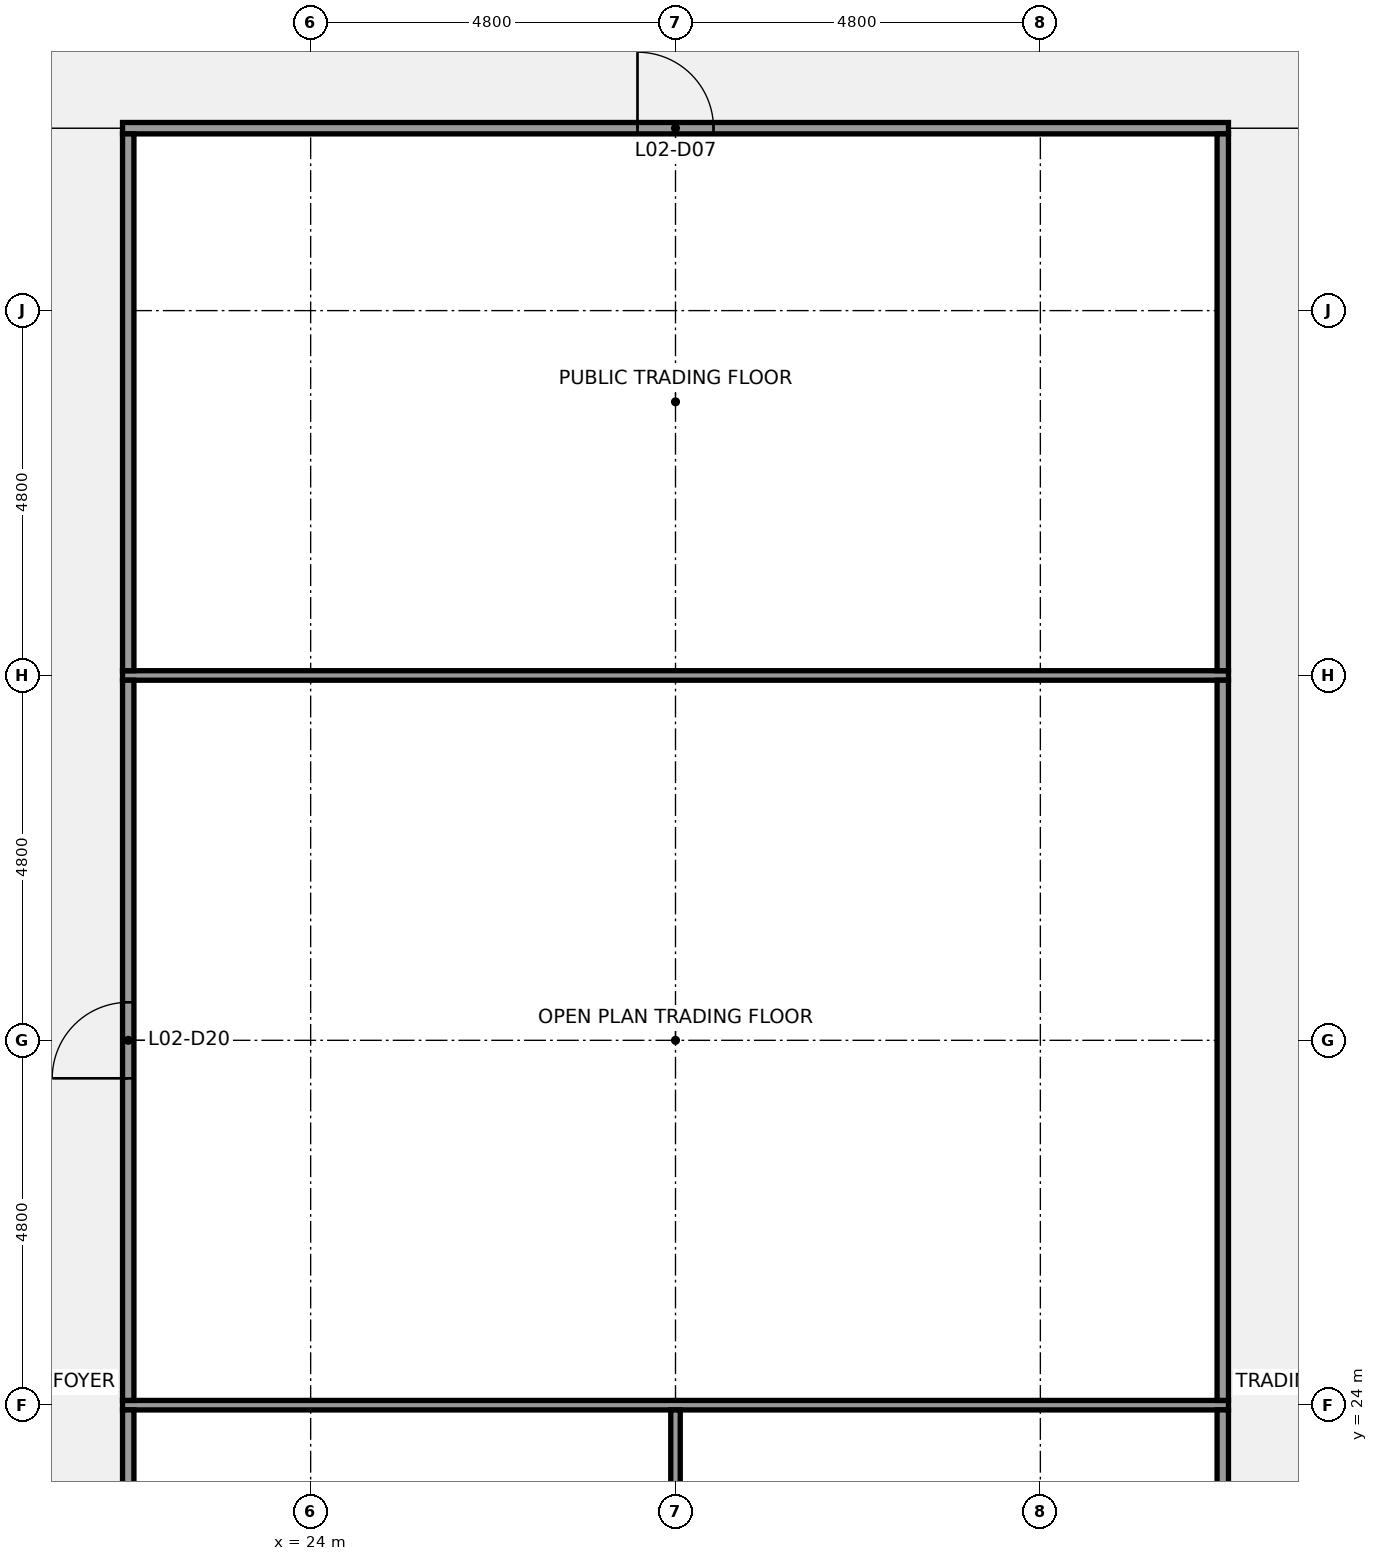
"""IFC4 building model, lengths in metres.
Left out: names, types, materials, properties, quantities, classifications, styles, units other than length and angle.
Written with IfcOpenShell. Run it as: python <this file> out.ifc"""

import sys

from ifc_helpers import new_model, si_unit, direction, frame, frame_2d, origin, place, context, subcontext, project, spatial, rectangle, extrude, element, fill, save


model = new_model("IFC4")
c1 = context("Model", 3, precision=1e-05, world=origin(), true_north=direction((0.0, 1.0)))
c2 = subcontext(c1, "Body", "Model", "MODEL_VIEW")
j1 = project(units=[si_unit("LENGTHUNIT", "METRE"), si_unit("PLANEANGLEUNIT", "RADIAN")], contexts=[c1])
p1 = place(None, origin())
s1 = spatial("IfcSite", under=j1, at=p1, CompositionType="ELEMENT")
p2 = place(p1, origin())
s2 = spatial("IfcBuilding", under=s1, at=p2, CompositionType="ELEMENT")
p3 = place(p2, frame((0.0, 0.0, 17.0)))
s3 = spatial("IfcBuildingStorey", under=s2, at=p3, CompositionType="ELEMENT", Elevation=17.0)
for number, where, z_axis, x_axis in (
    (1, (21.525, 24.0, 0.0), (0.0, 0.0, 1.0), (1.0, 0.0, 0.0)),
    (2, (21.525, 33.6, 0.0), (0.0, 0.0, 1.0), (1.0, 0.0, 0.0)),
):
    element("IfcWall", number, at=place(p3, frame(where, z_axis=z_axis, x_axis=x_axis)), inside=s3, PredefinedType="PARTITIONING", context=c2, shape_type="SweptSolid", body=[
        extrude(rectangle(XDim=14.55, YDim=0.125, at=frame_2d((7.275, 0.0))), origin(), (0.0, 0.0, 1.0), 3.25),
    ])
p4 = place(p3, frame((21.525, 40.8, 0.0), z_axis=(0.0, 0.0, 1.0), x_axis=(1.0, 0.0, 0.0)))
e3 = element("IfcWall", 3, at=p4, inside=s3, PredefinedType="PARTITIONING", context=c2, shape_type="SweptSolid", body=[
    extrude(rectangle(XDim=14.55, YDim=0.15, at=frame_2d((7.275, 0.0))), origin(), (0.0, 0.0, 1.0), 3.25),
])
p5 = place(p4, frame((6.775, 0.0, 0.0)))
e4 = element("IfcOpeningElement", 4, at=p5, cuts=e3, PredefinedType="OPENING", context=c2, shape_type="SweptSolid", body=[
    extrude(rectangle(XDim=1.0, YDim=2.1, at=frame_2d((0.5, 1.05))), frame((0.0, 0.085, 0.0), z_axis=(0.0, -1.0, 0.0), x_axis=(1.0, 0.0, 0.0)), (0.0, 0.0, 1.0), 0.17),
])
p6 = place(p3, frame((21.6, 14.462, 0.0), z_axis=(0.0, 0.0, 1.0), x_axis=(0.0, 1.0, 0.0)))
e5 = element("IfcWall", 5, at=p6, inside=s3, PredefinedType="PARTITIONING", context=c2, shape_type="SweptSolid", body=[
    extrude(rectangle(XDim=9.475, YDim=0.15, at=frame_2d((4.738, 0.0))), origin(), (0.0, 0.0, 1.0), 3.25),
])
p7 = place(p6, frame((4.238, 0.0, 0.0)))
e6 = element("IfcOpeningElement", 6, at=p7, cuts=e5, PredefinedType="OPENING", context=c2, shape_type="SweptSolid", body=[
    extrude(rectangle(XDim=1.0, YDim=2.1, at=frame_2d((0.5, 1.05))), frame((0.0, 0.085, 0.0), z_axis=(0.0, -1.0, 0.0), x_axis=(1.0, 0.0, 0.0)), (0.0, 0.0, 1.0), 0.17),
])
p8 = place(p3, frame((21.6, 24.062, 0.0), z_axis=(0.0, 0.0, 1.0), x_axis=(0.0, 1.0, 0.0)))
e7 = element("IfcWall", 7, at=p8, inside=s3, PredefinedType="PARTITIONING", context=c2, shape_type="SweptSolid", body=[
    extrude(rectangle(XDim=9.475, YDim=0.15, at=frame_2d((4.738, 0.0))), origin(), (0.0, 0.0, 1.0), 3.25),
])
p9 = place(p8, frame((4.238, 0.0, 0.0)))
e8 = element("IfcOpeningElement", 8, at=p9, cuts=e7, PredefinedType="OPENING", context=c2, shape_type="SweptSolid", body=[
    extrude(rectangle(XDim=1.0, YDim=2.1, at=frame_2d((0.5, 1.05))), frame((0.0, 0.085, 0.0), z_axis=(0.0, -1.0, 0.0), x_axis=(1.0, 0.0, 0.0)), (0.0, 0.0, 1.0), 0.17),
])
p10 = place(p3, frame((21.6, 33.663, 0.0), z_axis=(0.0, 0.0, 1.0), x_axis=(0.0, 1.0, 0.0)))
e9 = element("IfcWall", 9, at=p10, inside=s3, PredefinedType="PARTITIONING", context=c2, shape_type="SweptSolid", body=[
    extrude(rectangle(XDim=7.062, YDim=0.15, at=frame_2d((3.531, 0.0))), origin(), (0.0, 0.0, 1.0), 3.25),
])
p11 = place(p3, frame((28.8, 14.462, 0.0), z_axis=(0.0, 0.0, 1.0), x_axis=(0.0, 1.0, 0.0)))
e10 = element("IfcWall", 10, at=p11, inside=s3, PredefinedType="PARTITIONING", context=c2, shape_type="SweptSolid", body=[
    extrude(rectangle(XDim=9.475, YDim=0.125, at=frame_2d((4.738, 0.0))), origin(), (0.0, 0.0, 1.0), 3.25),
])
p12 = place(p3, frame((36.0, 14.462, 0.0), z_axis=(0.0, 0.0, 1.0), x_axis=(0.0, 1.0, 0.0)))
e11 = element("IfcWall", 11, at=p12, inside=s3, PredefinedType="PARTITIONING", context=c2, shape_type="SweptSolid", body=[
    extrude(rectangle(XDim=9.475, YDim=0.15, at=frame_2d((4.738, 0.0))), origin(), (0.0, 0.0, 1.0), 3.25),
])
p13 = place(p12, frame((4.238, 0.0, 0.0)))
e12 = element("IfcOpeningElement", 12, at=p13, cuts=e11, PredefinedType="OPENING", context=c2, shape_type="SweptSolid", body=[
    extrude(rectangle(XDim=1.0, YDim=2.1, at=frame_2d((0.5, 1.05))), frame((0.0, 0.085, 0.0), z_axis=(0.0, -1.0, 0.0), x_axis=(1.0, 0.0, 0.0)), (0.0, 0.0, 1.0), 0.17),
])
p14 = place(p3, frame((36.0, 24.062, 0.0), z_axis=(0.0, 0.0, 1.0), x_axis=(0.0, 1.0, 0.0)))
e13 = element("IfcWall", 13, at=p14, inside=s3, PredefinedType="PARTITIONING", context=c2, shape_type="SweptSolid", body=[
    extrude(rectangle(XDim=9.475, YDim=0.15, at=frame_2d((4.738, 0.0))), origin(), (0.0, 0.0, 1.0), 3.25),
])
p15 = place(p3, frame((36.0, 33.663, 0.0), z_axis=(0.0, 0.0, 1.0), x_axis=(0.0, 1.0, 0.0)))
e14 = element("IfcWall", 14, at=p15, inside=s3, PredefinedType="PARTITIONING", context=c2, shape_type="SweptSolid", body=[
    extrude(rectangle(XDim=7.062, YDim=0.15, at=frame_2d((3.531, 0.0))), origin(), (0.0, 0.0, 1.0), 3.25),
])
p16 = place(p5, origin())
e15 = element("IfcDoor", 15, at=p16, inside=s3, OperationType="SINGLE_SWING_LEFT", PredefinedType="DOOR", context=c2, shape_type="SweptSolid", body=[
    extrude(rectangle(XDim=1.0, YDim=2.1, at=frame_2d((0.5, 1.05))), frame((0.0, 0.025, 0.0), z_axis=(0.0, -1.0, 0.0), x_axis=(1.0, 0.0, 0.0)), (0.0, 0.0, 1.0), 0.05),
])
fill(e4, e15)
p17 = place(p9, origin())
e16 = element("IfcDoor", 16, at=p17, inside=s3, OperationType="SINGLE_SWING_LEFT", PredefinedType="DOOR", context=c2, shape_type="SweptSolid", body=[
    extrude(rectangle(XDim=1.0, YDim=2.1, at=frame_2d((0.5, 1.05))), frame((0.0, 0.025, 0.0), z_axis=(0.0, -1.0, 0.0), x_axis=(1.0, 0.0, 0.0)), (0.0, 0.0, 1.0), 0.05),
])
fill(e8, e16)
save(model, sys.argv[1])
